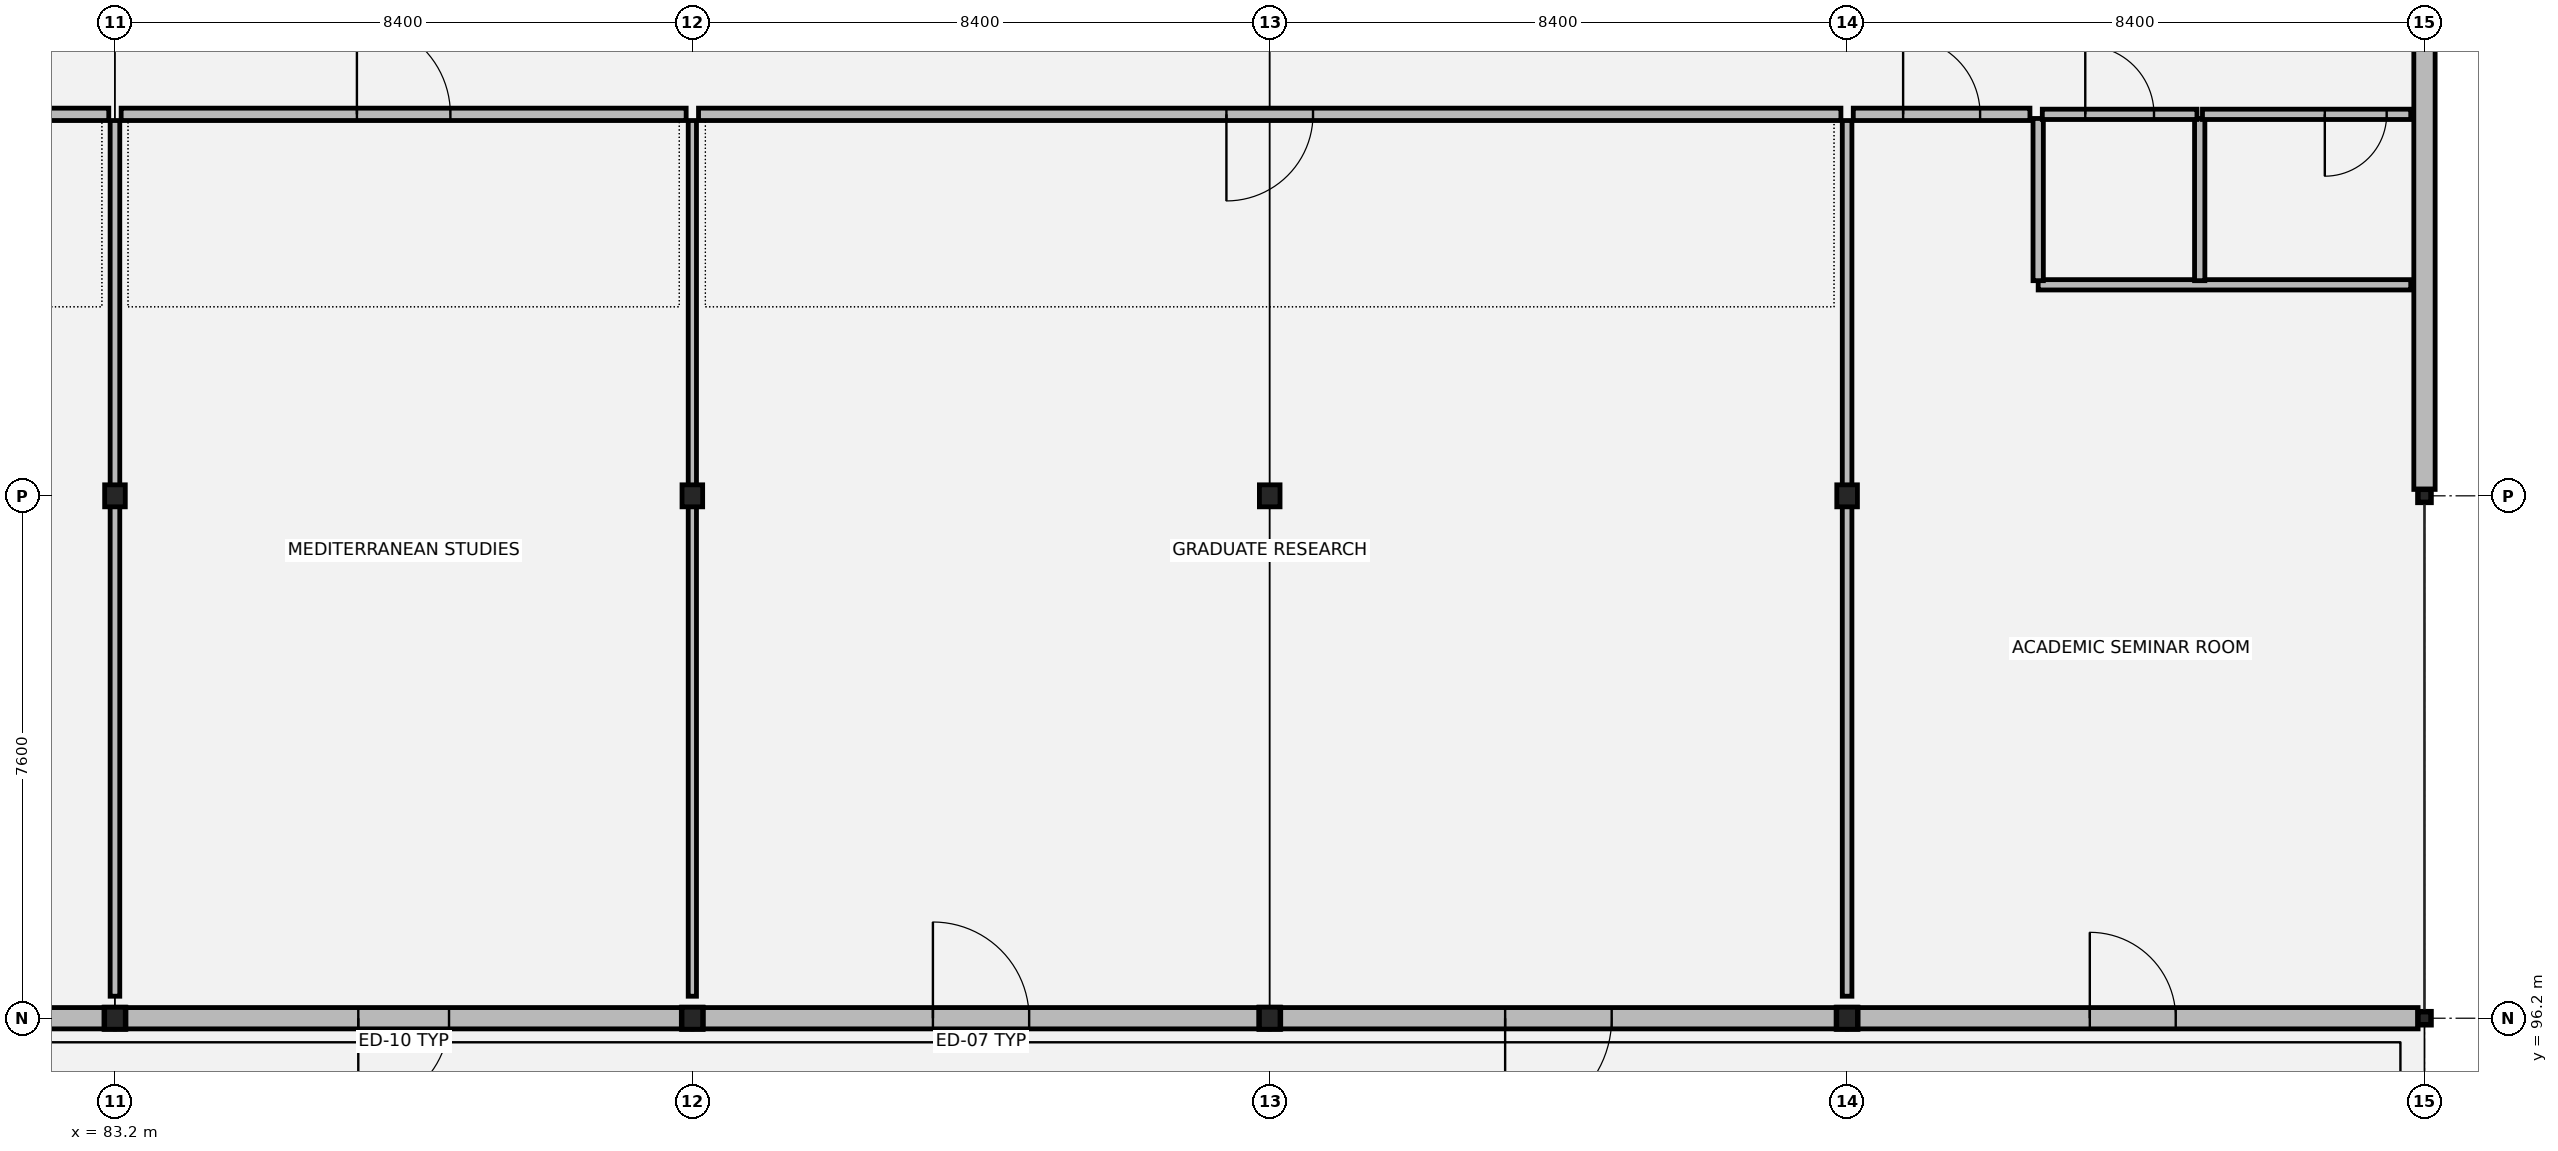
"""IFC4 building model, lengths in metres.
Left out: names, types, materials, properties, quantities, classifications, styles, units other than length and angle.
Written with IfcOpenShell. Run it as: python <this file> out.ifc"""

import sys

from ifc_helpers import new_model, si_unit, direction, frame, frame_2d, origin, origin_2d, place, context, subcontext, project, spatial, rectangle, hollow_rectangle, i_section, extrude, element, fill, save


model = new_model("IFC4")
c1 = context("Model", 3, precision=1e-05, world=origin(), true_north=direction((0.0, 1.0)))
c2 = subcontext(c1, "Body", "Model", "MODEL_VIEW")
j1 = project(units=[si_unit("LENGTHUNIT", "METRE"), si_unit("PLANEANGLEUNIT", "RADIAN")], contexts=[c1])
p1 = place(None, origin())
s1 = spatial("IfcSite", under=j1, at=p1, CompositionType="ELEMENT")
p2 = place(p1, origin())
s2 = spatial("IfcBuilding", under=s1, at=p2, CompositionType="ELEMENT")
p3 = place(p2, frame((0.0, 0.0, 17.34)))
s3 = spatial("IfcBuildingStorey", under=s2, at=p3, CompositionType="ELEMENT", Elevation=17.34)
p4 = place(p3, frame((83.2, 96.2, 0.0), z_axis=(0.0, 0.0, 1.0), x_axis=(1.0, 0.0, 0.0)))
e1 = element("IfcColumn", 1, at=p4, inside=s3, PredefinedType="COLUMN", context=c2, shape_type="SweptSolid", body=[
    extrude(i_section(OverallWidth=0.3, OverallDepth=0.32, WebThickness=0.011, FlangeThickness=0.021, at=origin_2d()), origin(), (0.0, 0.0, 1.0), 3.875),
])
p5 = place(p3, frame((83.2, 103.8, 0.0), z_axis=(0.0, 0.0, 1.0), x_axis=(1.0, 0.0, 0.0)))
e2 = element("IfcColumn", 2, at=p5, inside=s3, PredefinedType="COLUMN", context=c2, shape_type="SweptSolid", body=[
    extrude(i_section(OverallWidth=0.3, OverallDepth=0.32, WebThickness=0.011, FlangeThickness=0.021, at=origin_2d()), origin(), (0.0, 0.0, 1.0), 4.055),
])
p6 = place(p3, frame((91.6, 96.2, 0.0), z_axis=(0.0, 0.0, 1.0), x_axis=(1.0, 0.0, 0.0)))
e3 = element("IfcColumn", 3, at=p6, inside=s3, PredefinedType="COLUMN", context=c2, shape_type="SweptSolid", body=[
    extrude(i_section(OverallWidth=0.3, OverallDepth=0.32, WebThickness=0.011, FlangeThickness=0.021, at=origin_2d()), origin(), (0.0, 0.0, 1.0), 3.875),
])
p7 = place(p3, frame((91.6, 103.8, 0.0), z_axis=(0.0, 0.0, 1.0), x_axis=(1.0, 0.0, 0.0)))
e4 = element("IfcColumn", 4, at=p7, inside=s3, PredefinedType="COLUMN", context=c2, shape_type="SweptSolid", body=[
    extrude(i_section(OverallWidth=0.3, OverallDepth=0.32, WebThickness=0.011, FlangeThickness=0.021, at=origin_2d()), origin(), (0.0, 0.0, 1.0), 4.055),
])
p8 = place(p3, frame((100.0, 96.2, 0.0), z_axis=(0.0, 0.0, 1.0), x_axis=(1.0, 0.0, 0.0)))
e5 = element("IfcColumn", 5, at=p8, inside=s3, PredefinedType="COLUMN", context=c2, shape_type="SweptSolid", body=[
    extrude(i_section(OverallWidth=0.3, OverallDepth=0.32, WebThickness=0.011, FlangeThickness=0.021, at=origin_2d()), origin(), (0.0, 0.0, 1.0), 3.875),
])
p9 = place(p3, frame((100.0, 103.8, 0.0), z_axis=(0.0, 0.0, 1.0), x_axis=(1.0, 0.0, 0.0)))
e6 = element("IfcColumn", 6, at=p9, inside=s3, PredefinedType="COLUMN", context=c2, shape_type="SweptSolid", body=[
    extrude(i_section(OverallWidth=0.3, OverallDepth=0.32, WebThickness=0.011, FlangeThickness=0.021, at=origin_2d()), origin(), (0.0, 0.0, 1.0), 4.055),
])
p10 = place(p3, frame((108.4, 96.2, 0.0), z_axis=(0.0, 0.0, 1.0), x_axis=(1.0, 0.0, 0.0)))
e7 = element("IfcColumn", 7, at=p10, inside=s3, PredefinedType="COLUMN", context=c2, shape_type="SweptSolid", body=[
    extrude(i_section(OverallWidth=0.3, OverallDepth=0.32, WebThickness=0.011, FlangeThickness=0.021, at=origin_2d()), origin(), (0.0, 0.0, 1.0), 3.875),
])
p11 = place(p3, frame((108.4, 103.8, 0.0), z_axis=(0.0, 0.0, 1.0), x_axis=(1.0, 0.0, 0.0)))
e8 = element("IfcColumn", 8, at=p11, inside=s3, PredefinedType="COLUMN", context=c2, shape_type="SweptSolid", body=[
    extrude(i_section(OverallWidth=0.3, OverallDepth=0.32, WebThickness=0.011, FlangeThickness=0.021, at=origin_2d()), origin(), (0.0, 0.0, 1.0), 4.055),
])
for number, where, z_axis, x_axis in (
    (9, (116.8, 96.2, 0.0), (0.0, 0.0, 1.0), (1.0, 0.0, 0.0)),
    (10, (116.8, 103.8, 0.0), (0.0, 0.0, 1.0), (1.0, 0.0, 0.0)),
):
    element("IfcColumn", number, at=place(p3, frame(where, z_axis=z_axis, x_axis=x_axis)), inside=s3, PredefinedType="COLUMN", context=c2, shape_type="SweptSolid", body=[
        extrude(hollow_rectangle(XDim=0.18, YDim=0.18, WallThickness=0.01, at=origin_2d()), origin(), (0.0, 0.0, 1.0), 3.875),
    ])
p12 = place(p3, frame((74.805, 96.2, 0.0), z_axis=(0.0, 0.0, 1.0), x_axis=(1.0, 0.0, 0.0)))
e11 = element("IfcWall", 11, at=p12, inside=s3, PredefinedType="SOLIDWALL", context=c2, shape_type="SweptSolid", body=[
    extrude(rectangle(XDim=8.39, YDim=0.31, at=frame_2d((4.195, 0.0))), origin(), (0.0, 0.0, 1.0), 3.27),
])
p13 = place(p12, frame((3.57, 0.0, 0.0)))
e12 = element("IfcOpeningElement", 12, at=p13, cuts=e11, PredefinedType="OPENING", context=c2, shape_type="SweptSolid", body=[
    extrude(rectangle(XDim=1.25, YDim=2.2, at=frame_2d((0.625, 1.1))), frame((0.0, 0.165, 0.0), z_axis=(0.0, -1.0, 0.0), x_axis=(1.0, 0.0, 0.0)), (0.0, 0.0, 1.0), 0.33),
])
p14 = place(p3, frame((83.205, 96.2, 0.0), z_axis=(0.0, 0.0, 1.0), x_axis=(1.0, 0.0, 0.0)))
e13 = element("IfcWall", 13, at=p14, inside=s3, PredefinedType="SOLIDWALL", context=c2, shape_type="SweptSolid", body=[
    extrude(rectangle(XDim=8.39, YDim=0.31, at=frame_2d((4.195, 0.0))), origin(), (0.0, 0.0, 1.0), 3.27),
])
p15 = place(p14, frame((3.535, 0.0, 0.0)))
e14 = element("IfcOpeningElement", 14, at=p15, cuts=e13, PredefinedType="OPENING", context=c2, shape_type="SweptSolid", body=[
    extrude(rectangle(XDim=1.32, YDim=2.22, at=frame_2d((0.66, 1.11))), frame((0.0, 0.165, 0.0), z_axis=(0.0, -1.0, 0.0), x_axis=(1.0, 0.0, 0.0)), (0.0, 0.0, 1.0), 0.33),
])
p16 = place(p3, frame((91.605, 96.2, 0.0), z_axis=(0.0, 0.0, 1.0), x_axis=(1.0, 0.0, 0.0)))
e15 = element("IfcWall", 15, at=p16, inside=s3, PredefinedType="SOLIDWALL", context=c2, shape_type="SweptSolid", body=[
    extrude(rectangle(XDim=8.39, YDim=0.31, at=frame_2d((4.195, 0.0))), origin(), (0.0, 0.0, 1.0), 3.27),
])
p17 = place(p16, frame((3.495, 0.0, 0.0)))
e16 = element("IfcOpeningElement", 16, at=p17, cuts=e15, PredefinedType="OPENING", context=c2, shape_type="SweptSolid", body=[
    extrude(rectangle(XDim=1.4, YDim=2.25, at=frame_2d((0.7, 1.125))), frame((0.0, 0.165, 0.0), z_axis=(0.0, -1.0, 0.0), x_axis=(1.0, 0.0, 0.0)), (0.0, 0.0, 1.0), 0.33),
])
p18 = place(p3, frame((100.005, 96.2, 0.0), z_axis=(0.0, 0.0, 1.0), x_axis=(1.0, 0.0, 0.0)))
e17 = element("IfcWall", 17, at=p18, inside=s3, PredefinedType="SOLIDWALL", context=c2, shape_type="SweptSolid", body=[
    extrude(rectangle(XDim=8.39, YDim=0.31, at=frame_2d((4.195, 0.0))), origin(), (0.0, 0.0, 1.0), 3.27),
])
p19 = place(p18, frame((3.42, 0.0, 0.0)))
e18 = element("IfcOpeningElement", 18, at=p19, cuts=e17, PredefinedType="OPENING", context=c2, shape_type="SweptSolid", body=[
    extrude(rectangle(XDim=1.55, YDim=2.28, at=frame_2d((0.775, 1.14))), frame((0.0, 0.165, 0.0), z_axis=(0.0, -1.0, 0.0), x_axis=(1.0, 0.0, 0.0)), (0.0, 0.0, 1.0), 0.33),
])
p20 = place(p3, frame((108.405, 96.2, 0.0), z_axis=(0.0, 0.0, 1.0), x_axis=(1.0, 0.0, 0.0)))
e19 = element("IfcWall", 19, at=p20, inside=s3, PredefinedType="SOLIDWALL", context=c2, shape_type="SweptSolid", body=[
    extrude(rectangle(XDim=8.302, YDim=0.31, at=frame_2d((4.151, 0.0))), origin(), (0.0, 0.0, 1.0), 3.27),
])
p21 = place(p20, frame((3.526, 0.0, 0.0)))
e20 = element("IfcOpeningElement", 20, at=p21, cuts=e19, PredefinedType="OPENING", context=c2, shape_type="SweptSolid", body=[
    extrude(rectangle(XDim=1.25, YDim=2.2, at=frame_2d((0.625, 1.1))), frame((0.0, 0.165, 0.0), z_axis=(0.0, -1.0, 0.0), x_axis=(1.0, 0.0, 0.0)), (0.0, 0.0, 1.0), 0.33),
])
p22 = place(p3, frame((116.8, 103.893, 0.0), z_axis=(0.0, 0.0, 1.0), x_axis=(0.0, 1.0, 0.0)))
e21 = element("IfcWall", 21, at=p22, inside=s3, PredefinedType="SOLIDWALL", context=c2, shape_type="SweptSolid", body=[
    extrude(rectangle(XDim=7.414, YDim=0.31, at=frame_2d((3.707, 0.0))), origin(), (0.0, 0.0, 1.0), 3.48),
])
p23 = place(p3, frame((111.18, 106.87, 0.0), z_axis=(0.0, 0.0, 1.0), x_axis=(1.0, 0.0, 0.0)))
e22 = element("IfcWall", 22, at=p23, inside=s3, PredefinedType="PARTITIONING", context=c2, shape_type="SweptSolid", body=[
    extrude(rectangle(XDim=5.42, YDim=0.15, at=frame_2d((2.71, 0.0))), origin(), (0.0, 0.0, 1.0), 3.18),
])
for number, where, z_axis, x_axis in (
    (23, (111.18, 106.93, 0.0), (0.0, 0.0, 1.0), (0.0, 1.0, 0.0)),
    (24, (113.53, 106.93, 0.0), (0.0, 0.0, 1.0), (0.0, 1.0, 0.0)),
):
    element("IfcWall", number, at=place(p3, frame(where, z_axis=z_axis, x_axis=x_axis)), inside=s3, PredefinedType="PARTITIONING", context=c2, shape_type="SweptSolid", body=[
        extrude(rectangle(XDim=2.36, YDim=0.15, at=frame_2d((1.18, 0.0))), origin(), (0.0, 0.0, 1.0), 3.18),
    ])
p24 = place(p3, frame((111.24, 109.35, 0.0), z_axis=(0.0, 0.0, 1.0), x_axis=(1.0, 0.0, 0.0)))
e25 = element("IfcWall", 25, at=p24, inside=s3, PredefinedType="PARTITIONING", context=c2, shape_type="SweptSolid", body=[
    extrude(rectangle(XDim=2.25, YDim=0.15, at=frame_2d((1.125, 0.0))), origin(), (0.0, 0.0, 1.0), 3.18),
])
p25 = place(p24, frame((0.625, 0.0, 0.0)))
e26 = element("IfcOpeningElement", 26, at=p25, cuts=e25, PredefinedType="OPENING", context=c2, shape_type="SweptSolid", body=[
    extrude(rectangle(XDim=1.0, YDim=2.15, at=frame_2d((0.5, 1.075))), frame((0.0, 0.085, 0.0), z_axis=(0.0, -1.0, 0.0), x_axis=(1.0, 0.0, 0.0)), (0.0, 0.0, 1.0), 0.17),
])
p26 = place(p3, frame((113.57, 109.35, 0.0), z_axis=(0.0, 0.0, 1.0), x_axis=(1.0, 0.0, 0.0)))
e27 = element("IfcWall", 27, at=p26, inside=s3, PredefinedType="PARTITIONING", context=c2, shape_type="SweptSolid", body=[
    extrude(rectangle(XDim=3.03, YDim=0.15, at=frame_2d((1.515, 0.0))), origin(), (0.0, 0.0, 1.0), 3.18),
])
p27 = place(p26, frame((1.78, 0.0, 0.0)))
e28 = element("IfcOpeningElement", 28, at=p27, cuts=e27, PredefinedType="OPENING", context=c2, shape_type="SweptSolid", body=[
    extrude(rectangle(XDim=0.9, YDim=2.15, at=frame_2d((0.45, 1.075))), frame((0.0, 0.085, 0.0), z_axis=(0.0, -1.0, 0.0), x_axis=(1.0, 0.0, 0.0)), (0.0, 0.0, 1.0), 0.17),
])
p28 = place(p3, frame((66.6, 109.35, 0.0), z_axis=(0.0, 0.0, 1.0), x_axis=(1.0, 0.0, 0.0)))
e29 = element("IfcWall", 29, at=p28, inside=s3, PredefinedType="PARTITIONING", context=c2, shape_type="SweptSolid", body=[
    extrude(rectangle(XDim=16.51, YDim=0.18, at=frame_2d((8.255, 0.0))), origin(), (0.0, 0.0, 1.0), 3.18),
])
p29 = place(p28, frame((7.455, 0.0, 0.0)))
e30 = element("IfcOpeningElement", 30, at=p29, cuts=e29, PredefinedType="OPENING", context=c2, shape_type="SweptSolid", body=[
    extrude(rectangle(XDim=1.6, YDim=2.25, at=frame_2d((0.8, 1.125))), frame((0.0, 0.1, 0.0), z_axis=(0.0, -1.0, 0.0), x_axis=(1.0, 0.0, 0.0)), (0.0, 0.0, 1.0), 0.2),
])
p30 = place(p3, frame((83.29, 109.35, 0.0), z_axis=(0.0, 0.0, 1.0), x_axis=(1.0, 0.0, 0.0)))
e31 = element("IfcWall", 31, at=p30, inside=s3, PredefinedType="PARTITIONING", context=c2, shape_type="SweptSolid", body=[
    extrude(rectangle(XDim=8.22, YDim=0.18, at=frame_2d((4.11, 0.0))), origin(), (0.0, 0.0, 1.0), 3.18),
])
p31 = place(p30, frame((3.43, 0.0, 0.0)))
e32 = element("IfcOpeningElement", 32, at=p31, cuts=e31, PredefinedType="OPENING", context=c2, shape_type="SweptSolid", body=[
    extrude(rectangle(XDim=1.36, YDim=2.2, at=frame_2d((0.68, 1.1))), frame((0.0, 0.1, 0.0), z_axis=(0.0, -1.0, 0.0), x_axis=(1.0, 0.0, 0.0)), (0.0, 0.0, 1.0), 0.2),
])
p32 = place(p3, frame((91.69, 109.35, 0.0), z_axis=(0.0, 0.0, 1.0), x_axis=(1.0, 0.0, 0.0)))
e33 = element("IfcWall", 33, at=p32, inside=s3, PredefinedType="PARTITIONING", context=c2, shape_type="SweptSolid", body=[
    extrude(rectangle(XDim=16.62, YDim=0.18, at=frame_2d((8.31, 0.0))), origin(), (0.0, 0.0, 1.0), 3.18),
])
p33 = place(p32, frame((7.68, 0.0, 0.0)))
e34 = element("IfcOpeningElement", 34, at=p33, cuts=e33, PredefinedType="OPENING", context=c2, shape_type="SweptSolid", body=[
    extrude(rectangle(XDim=1.26, YDim=2.2, at=frame_2d((0.63, 1.1))), frame((0.0, 0.1, 0.0), z_axis=(0.0, -1.0, 0.0), x_axis=(1.0, 0.0, 0.0)), (0.0, 0.0, 1.0), 0.2),
])
p34 = place(p3, frame((108.49, 109.35, 0.0), z_axis=(0.0, 0.0, 1.0), x_axis=(1.0, 0.0, 0.0)))
e35 = element("IfcWall", 35, at=p34, inside=s3, PredefinedType="PARTITIONING", context=c2, shape_type="SweptSolid", body=[
    extrude(rectangle(XDim=2.57, YDim=0.18, at=frame_2d((1.285, 0.0))), origin(), (0.0, 0.0, 1.0), 3.18),
])
p35 = place(p34, frame((0.725, 0.0, 0.0)))
e36 = element("IfcOpeningElement", 36, at=p35, cuts=e35, PredefinedType="OPENING", context=c2, shape_type="SweptSolid", body=[
    extrude(rectangle(XDim=1.12, YDim=2.15, at=frame_2d((0.56, 1.075))), frame((0.0, 0.1, 0.0), z_axis=(0.0, -1.0, 0.0), x_axis=(1.0, 0.0, 0.0)), (0.0, 0.0, 1.0), 0.2),
])
p36 = place(p3, frame((83.2, 96.52, 0.0), z_axis=(0.0, 0.0, 1.0), x_axis=(0.0, 1.0, 0.0)))
e37 = element("IfcWall", 37, at=p36, inside=s3, PredefinedType="PARTITIONING", context=c2, shape_type="SweptSolid", body=[
    extrude(rectangle(XDim=12.74, YDim=0.14, at=frame_2d((6.37, 0.0))), origin(), (0.0, 0.0, 1.0), 3.18),
])
p37 = place(p3, frame((91.6, 96.52, 0.0), z_axis=(0.0, 0.0, 1.0), x_axis=(0.0, 1.0, 0.0)))
e38 = element("IfcWall", 38, at=p37, inside=s3, PredefinedType="PARTITIONING", context=c2, shape_type="SweptSolid", body=[
    extrude(rectangle(XDim=12.74, YDim=0.12, at=frame_2d((6.37, 0.0))), origin(), (0.0, 0.0, 1.0), 3.18),
])
p38 = place(p3, frame((108.4, 96.52, 0.0), z_axis=(0.0, 0.0, 1.0), x_axis=(0.0, 1.0, 0.0)))
e39 = element("IfcWall", 39, at=p38, inside=s3, PredefinedType="PARTITIONING", context=c2, shape_type="SweptSolid", body=[
    extrude(rectangle(XDim=12.74, YDim=0.14, at=frame_2d((6.37, 0.0))), origin(), (0.0, 0.0, 1.0), 3.18),
])
p39 = place(p15, origin())
e40 = element("IfcDoor", 40, at=p39, inside=s3, OperationType="SINGLE_SWING_RIGHT", PredefinedType="DOOR", context=c2, shape_type="SweptSolid", body=[
    extrude(rectangle(XDim=1.32, YDim=2.22, at=frame_2d((0.66, 1.11))), frame((0.0, 0.025, 0.0), z_axis=(0.0, -1.0, 0.0), x_axis=(1.0, 0.0, 0.0)), (0.0, 0.0, 1.0), 0.05),
])
fill(e14, e40)
p40 = place(p17, origin())
e41 = element("IfcDoor", 41, at=p40, inside=s3, OperationType="SINGLE_SWING_LEFT", PredefinedType="DOOR", context=c2, shape_type="SweptSolid", body=[
    extrude(rectangle(XDim=1.4, YDim=2.25, at=frame_2d((0.7, 1.125))), frame((0.0, 0.025, 0.0), z_axis=(0.0, -1.0, 0.0), x_axis=(1.0, 0.0, 0.0)), (0.0, 0.0, 1.0), 0.05),
])
fill(e16, e41)
p41 = place(p19, origin())
e42 = element("IfcDoor", 42, at=p41, inside=s3, OperationType="SINGLE_SWING_RIGHT", PredefinedType="DOOR", context=c2, shape_type="SweptSolid", body=[
    extrude(rectangle(XDim=1.55, YDim=2.28, at=frame_2d((0.775, 1.14))), frame((0.0, 0.025, 0.0), z_axis=(0.0, -1.0, 0.0), x_axis=(1.0, 0.0, 0.0)), (0.0, 0.0, 1.0), 0.05),
])
fill(e18, e42)
p42 = place(p21, origin())
e43 = element("IfcDoor", 43, at=p42, inside=s3, OperationType="SINGLE_SWING_LEFT", PredefinedType="DOOR", context=c2, shape_type="SweptSolid", body=[
    extrude(rectangle(XDim=1.25, YDim=2.2, at=frame_2d((0.625, 1.1))), frame((0.0, 0.025, 0.0), z_axis=(0.0, -1.0, 0.0), x_axis=(1.0, 0.0, 0.0)), (0.0, 0.0, 1.0), 0.05),
])
fill(e20, e43)
p43 = place(p25, origin())
e44 = element("IfcDoor", 44, at=p43, inside=s3, OperationType="SINGLE_SWING_LEFT", PredefinedType="DOOR", context=c2, shape_type="SweptSolid", body=[
    extrude(rectangle(XDim=1.0, YDim=2.15, at=frame_2d((0.5, 1.075))), frame((0.0, 0.025, 0.0), z_axis=(0.0, -1.0, 0.0), x_axis=(1.0, 0.0, 0.0)), (0.0, 0.0, 1.0), 0.05),
])
fill(e26, e44)
p44 = place(p27, origin())
e45 = element("IfcDoor", 45, at=p44, inside=s3, OperationType="SINGLE_SWING_RIGHT", PredefinedType="DOOR", context=c2, shape_type="SweptSolid", body=[
    extrude(rectangle(XDim=0.9, YDim=2.15, at=frame_2d((0.45, 1.075))), frame((0.0, 0.025, 0.0), z_axis=(0.0, -1.0, 0.0), x_axis=(1.0, 0.0, 0.0)), (0.0, 0.0, 1.0), 0.05),
])
fill(e28, e45)
p45 = place(p31, origin())
e46 = element("IfcDoor", 46, at=p45, inside=s3, OperationType="SINGLE_SWING_LEFT", PredefinedType="DOOR", context=c2, shape_type="SweptSolid", body=[
    extrude(rectangle(XDim=1.36, YDim=2.2, at=frame_2d((0.68, 1.1))), frame((0.0, 0.025, 0.0), z_axis=(0.0, -1.0, 0.0), x_axis=(1.0, 0.0, 0.0)), (0.0, 0.0, 1.0), 0.05),
])
fill(e32, e46)
p46 = place(p33, origin())
e47 = element("IfcDoor", 47, at=p46, inside=s3, OperationType="SINGLE_SWING_RIGHT", PredefinedType="DOOR", context=c2, shape_type="SweptSolid", body=[
    extrude(rectangle(XDim=1.26, YDim=2.2, at=frame_2d((0.63, 1.1))), frame((0.0, 0.025, 0.0), z_axis=(0.0, -1.0, 0.0), x_axis=(1.0, 0.0, 0.0)), (0.0, 0.0, 1.0), 0.05),
])
fill(e34, e47)
p47 = place(p35, origin())
e48 = element("IfcDoor", 48, at=p47, inside=s3, OperationType="SINGLE_SWING_LEFT", PredefinedType="DOOR", context=c2, shape_type="SweptSolid", body=[
    extrude(rectangle(XDim=1.12, YDim=2.15, at=frame_2d((0.56, 1.075))), frame((0.0, 0.025, 0.0), z_axis=(0.0, -1.0, 0.0), x_axis=(1.0, 0.0, 0.0)), (0.0, 0.0, 1.0), 0.05),
])
fill(e36, e48)
save(model, sys.argv[1])
